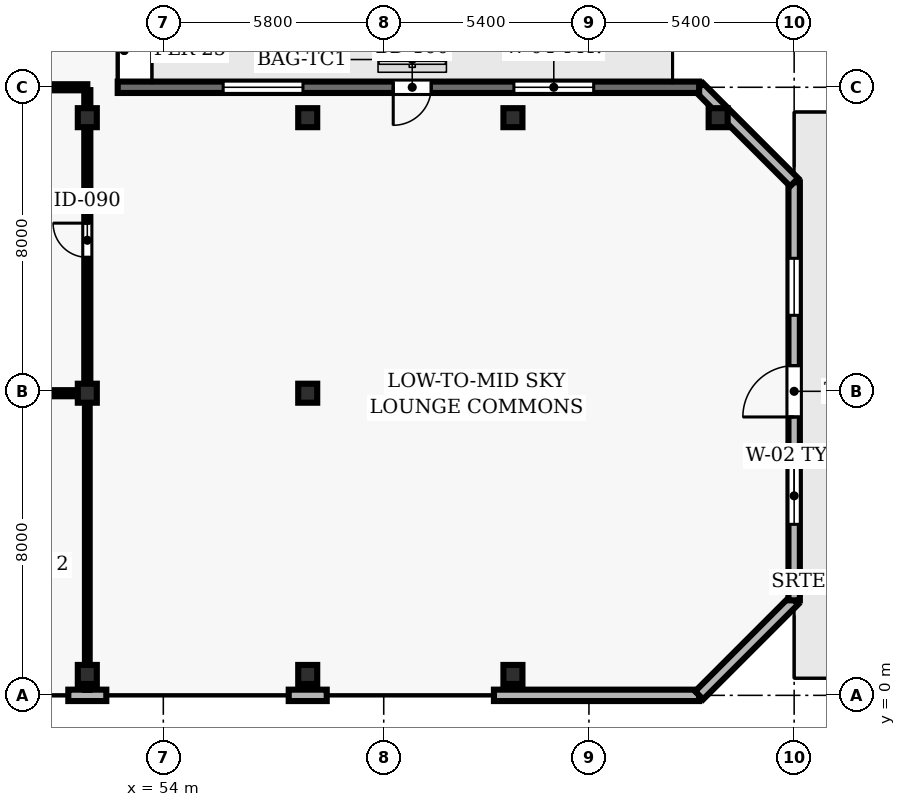
"""IFC4 building model, lengths in metres.
Left out: names, types, materials, properties, quantities, classifications, styles, units other than length and angle.
Written with IfcOpenShell. Run it as: python <this file> out.ifc"""

import sys

from ifc_helpers import new_model, si_unit, direction, frame, frame_2d, origin, origin_2d, place, context, subcontext, project, spatial, rectangle, hollow_rectangle, extrude, element, fill, save


model = new_model("IFC4")
c1 = context("Model", 3, precision=1e-05, world=origin(), true_north=direction((0.0, 1.0)))
c2 = subcontext(c1, "Body", "Model", "MODEL_VIEW")
j1 = project(units=[si_unit("LENGTHUNIT", "METRE"), si_unit("PLANEANGLEUNIT", "RADIAN")], contexts=[c1])
p1 = place(None, origin())
s1 = spatial("IfcSite", under=j1, at=p1, CompositionType="ELEMENT")
p2 = place(p1, origin())
s2 = spatial("IfcBuilding", under=s1, at=p2, CompositionType="ELEMENT")
p3 = place(p2, frame((0.0, 0.0, 98.4)))
s3 = spatial("IfcBuildingStorey", under=s2, at=p3, CompositionType="ELEMENT", Elevation=98.4)
for number, where, z_axis, x_axis in (
    (1, (52.0, 0.55, 0.0), (0.0, 0.0, 1.0), (1.0, 0.0, 0.0)),
    (2, (52.0, 7.95, 0.0), (0.0, 0.0, 1.0), (1.0, 0.0, 0.0)),
    (3, (52.0, 15.2, 0.0), (0.0, 0.0, 1.0), (1.0, 0.0, 0.0)),
    (4, (57.8, 0.55, 0.0), (0.0, 0.0, 1.0), (1.0, 0.0, 0.0)),
    (5, (57.8, 7.95, 0.0), (0.0, 0.0, 1.0), (1.0, 0.0, 0.0)),
    (6, (57.8, 15.2, 0.0), (0.0, 0.0, 1.0), (1.0, 0.0, 0.0)),
    (7, (63.2, 0.55, 0.0), (0.0, 0.0, 1.0), (1.0, 0.0, 0.0)),
    (8, (63.2, 15.2, 0.0), (0.0, 0.0, 1.0), (1.0, 0.0, 0.0)),
    (9, (68.6, 15.2, 0.0), (0.0, 0.0, 1.0), (1.0, 0.0, 0.0)),
):
    element("IfcColumn", number, at=place(p3, frame(where, z_axis=z_axis, x_axis=x_axis)), inside=s3, PredefinedType="COLUMN", context=c2, shape_type="SweptSolid", body=[
        extrude(hollow_rectangle(XDim=0.5, YDim=0.5, WallThickness=0.025, at=origin_2d()), origin(), (0.0, 0.0, 1.0), 5.0),
    ])
for number, where, z_axis, x_axis in (
    (10, (51.5, 0.0, 0.0), (0.0, 0.0, 1.0), (1.0, 0.0, 0.0)),
    (11, (57.3, 0.0, 0.0), (0.0, 0.0, 1.0), (1.0, 0.0, 0.0)),
):
    element("IfcWall", number, at=place(p3, frame(where, z_axis=z_axis, x_axis=x_axis)), inside=s3, PredefinedType="SOLIDWALL", context=c2, shape_type="SweptSolid", body=[
        extrude(rectangle(XDim=1.0, YDim=0.3, at=frame_2d((0.5, 0.0))), origin(), (0.0, 0.0, 1.0), 4.79),
    ])
p4 = place(p3, frame((62.7, 0.0, 0.0), z_axis=(0.0, 0.0, 1.0), x_axis=(1.0, 0.0, 0.0)))
e12 = element("IfcWall", 12, at=p4, inside=s3, PredefinedType="SOLIDWALL", context=c2, shape_type="SweptSolid", body=[
    extrude(rectangle(XDim=5.4, YDim=0.3, at=frame_2d((2.7, 0.0))), origin(), (0.0, 0.0, 1.0), 4.79),
])
p5 = place(p3, frame((68.1, 0.0, 0.0), z_axis=(0.0, 0.0, 1.0), x_axis=(0.707106781187, 0.707106781187, 0.0)))
e13 = element("IfcWall", 13, at=p5, inside=s3, PredefinedType="SOLIDWALL", context=c2, shape_type="SweptSolid", body=[
    extrude(rectangle(XDim=3.536, YDim=0.3, at=frame_2d((1.768, 0.0))), origin(), (0.0, 0.0, 1.0), 4.79),
])
p6 = place(p3, frame((70.6, 2.5, 0.0), z_axis=(0.0, 0.0, 1.0), x_axis=(0.0, 1.0, 0.0)))
e14 = element("IfcWall", 14, at=p6, inside=s3, PredefinedType="SOLIDWALL", context=c2, shape_type="SweptSolid", body=[
    extrude(rectangle(XDim=11.0, YDim=0.3, at=frame_2d((5.5, 0.0))), origin(), (0.0, 0.0, 1.0), 4.79),
])
p7 = place(p6, frame((4.825, 0.0, 0.0)))
e15 = element("IfcOpeningElement", 15, at=p7, cuts=e14, PredefinedType="OPENING", context=c2, shape_type="SweptSolid", body=[
    extrude(rectangle(XDim=1.35, YDim=2.2, at=frame_2d((0.675, 1.1))), frame((0.0, 0.16, 0.0), z_axis=(0.0, -1.0, 0.0), x_axis=(1.0, 0.0, 0.0)), (0.0, 0.0, 1.0), 0.32),
])
p8 = place(p6, frame((2.0, 0.0, 0.9)))
e16 = element("IfcOpeningElement", 16, at=p8, cuts=e14, PredefinedType="OPENING", context=c2, shape_type="SweptSolid", body=[
    extrude(rectangle(XDim=1.5, YDim=1.6, at=frame_2d((0.75, 0.8))), frame((0.0, 0.16, 0.0), z_axis=(0.0, -1.0, 0.0), x_axis=(1.0, 0.0, 0.0)), (0.0, 0.0, 1.0), 0.32),
])
p9 = place(p6, frame((7.5, 0.0, 0.9)))
e17 = element("IfcOpeningElement", 17, at=p9, cuts=e14, PredefinedType="OPENING", context=c2, shape_type="SweptSolid", body=[
    extrude(rectangle(XDim=1.5, YDim=1.6, at=frame_2d((0.75, 0.8))), frame((0.0, 0.16, 0.0), z_axis=(0.0, -1.0, 0.0), x_axis=(1.0, 0.0, 0.0)), (0.0, 0.0, 1.0), 0.32),
])
p10 = place(p3, frame((70.6, 13.5, 0.0), z_axis=(0.0, 0.0, 1.0), x_axis=(-0.707106781187, 0.707106781187, 0.0)))
e18 = element("IfcWall", 18, at=p10, inside=s3, PredefinedType="SOLIDWALL", context=c2, shape_type="SweptSolid", body=[
    extrude(rectangle(XDim=3.536, YDim=0.3, at=frame_2d((1.768, 0.0))), origin(), (0.0, 0.0, 1.0), 4.79),
])
p11 = place(p3, frame((68.1, 16.0, 0.0), z_axis=(0.0, 0.0, 1.0), x_axis=(-1.0, 0.0, 0.0)))
e19 = element("IfcWall", 19, at=p11, inside=s3, PredefinedType="SOLIDWALL", context=c2, shape_type="SweptSolid", body=[
    extrude(rectangle(XDim=15.3, YDim=0.3, at=frame_2d((7.65, 0.0))), origin(), (0.0, 0.0, 1.0), 4.79),
])
p12 = place(p11, frame((7.05, 0.0, 0.0)))
e20 = element("IfcOpeningElement", 20, at=p12, cuts=e19, PredefinedType="OPENING", context=c2, shape_type="SweptSolid", body=[
    extrude(rectangle(XDim=1.0, YDim=2.2, at=frame_2d((0.5, 1.1))), frame((0.0, 0.16, 0.0), z_axis=(0.0, -1.0, 0.0), x_axis=(1.0, 0.0, 0.0)), (0.0, 0.0, 1.0), 0.32),
])
p13 = place(p11, frame((2.775, 0.0, 0.9)))
e21 = element("IfcOpeningElement", 21, at=p13, cuts=e19, PredefinedType="OPENING", context=c2, shape_type="SweptSolid", body=[
    extrude(rectangle(XDim=2.1, YDim=1.6, at=frame_2d((1.05, 0.8))), frame((0.0, 0.16, 0.0), z_axis=(0.0, -1.0, 0.0), x_axis=(1.0, 0.0, 0.0)), (0.0, 0.0, 1.0), 0.32),
])
p14 = place(p11, frame((10.425, 0.0, 0.9)))
e22 = element("IfcOpeningElement", 22, at=p14, cuts=e19, PredefinedType="OPENING", context=c2, shape_type="SweptSolid", body=[
    extrude(rectangle(XDim=2.1, YDim=1.6, at=frame_2d((1.05, 0.8))), frame((0.0, 0.16, 0.0), z_axis=(0.0, -1.0, 0.0), x_axis=(1.0, 0.0, 0.0)), (0.0, 0.0, 1.0), 0.32),
])
p15 = place(p3, frame((46.0, 7.95, 0.0), z_axis=(0.0, 0.0, 1.0), x_axis=(1.0, 0.0, 0.0)))
e23 = element("IfcWall", 23, at=p15, inside=s3, PredefinedType="PARTITIONING", context=c2, shape_type="SweptSolid", body=[
    extrude(rectangle(XDim=6.0, YDim=0.16, at=frame_2d((3.0, 0.0))), origin(), (0.0, 0.0, 1.0), 4.173),
])
p16 = place(p15, frame((2.5, 0.0, 0.0)))
e24 = element("IfcOpeningElement", 24, at=p16, cuts=e23, PredefinedType="OPENING", context=c2, shape_type="SweptSolid", body=[
    extrude(rectangle(XDim=1.0, YDim=2.1, at=frame_2d((0.5, 1.05))), frame((0.0, 0.09, 0.0), z_axis=(0.0, -1.0, 0.0), x_axis=(1.0, 0.0, 0.0)), (0.0, 0.0, 1.0), 0.18),
])
p17 = place(p3, frame((52.0, 16.0, 0.0), z_axis=(0.0, 0.0, 1.0), x_axis=(-1.0, 0.0, 0.0)))
e25 = element("IfcWall", 25, at=p17, inside=s3, PredefinedType="PARTITIONING", context=c2, shape_type="SweptSolid", body=[
    extrude(rectangle(XDim=13.95, YDim=0.16, at=frame_2d((6.975, 0.0))), origin(), (0.0, 0.0, 1.0), 4.49),
])
p18 = place(p17, frame((7.575, 0.0, 0.0)))
e26 = element("IfcOpeningElement", 26, at=p18, cuts=e25, PredefinedType="OPENING", context=c2, shape_type="SweptSolid", body=[
    extrude(rectangle(XDim=0.9, YDim=2.1, at=frame_2d((0.45, 1.05))), frame((0.0, 0.09, 0.0), z_axis=(0.0, -1.0, 0.0), x_axis=(1.0, 0.0, 0.0)), (0.0, 0.0, 1.0), 0.18),
])
p19 = place(p3, frame((52.0, 7.875, 0.0), z_axis=(0.0, 0.0, 1.0), x_axis=(0.0, -1.0, 0.0)))
e27 = element("IfcWall", 27, at=p19, inside=s3, PredefinedType="PARTITIONING", context=c2, shape_type="SweptSolid", body=[
    extrude(rectangle(XDim=7.73, YDim=0.125, at=frame_2d((3.865, 0.0))), origin(), (0.0, 0.0, 1.0), 4.173),
])
p20 = place(p3, frame((52.0, 8.025, 0.0), z_axis=(0.0, 0.0, 1.0), x_axis=(0.0, 1.0, 0.0)))
e28 = element("IfcWall", 28, at=p20, inside=s3, PredefinedType="PARTITIONING", context=c2, shape_type="SweptSolid", body=[
    extrude(rectangle(XDim=7.9, YDim=0.16, at=frame_2d((3.95, 0.0))), origin(), (0.0, 0.0, 1.0), 4.173),
])
p21 = place(p20, frame((3.5, 0.0, 0.0)))
e29 = element("IfcOpeningElement", 29, at=p21, cuts=e28, PredefinedType="OPENING", context=c2, shape_type="SweptSolid", body=[
    extrude(rectangle(XDim=0.9, YDim=2.1, at=frame_2d((0.45, 1.05))), frame((0.0, 0.09, 0.0), z_axis=(0.0, -1.0, 0.0), x_axis=(1.0, 0.0, 0.0)), (0.0, 0.0, 1.0), 0.18),
])
p22 = place(p7, origin())
e30 = element("IfcDoor", 30, at=p22, inside=s3, OperationType="SINGLE_SWING_LEFT", PredefinedType="DOOR", context=c2, shape_type="SweptSolid", body=[
    extrude(rectangle(XDim=1.35, YDim=2.2, at=frame_2d((0.675, 1.1))), frame((0.0, 0.025, 0.0), z_axis=(0.0, -1.0, 0.0), x_axis=(1.0, 0.0, 0.0)), (0.0, 0.0, 1.0), 0.05),
])
fill(e15, e30)
p23 = place(p8, origin())
e31 = element("IfcWindow", 31, at=p23, inside=s3, PartitioningType="SINGLE_PANEL", PredefinedType="WINDOW", context=c2, shape_type="SweptSolid", body=[
    extrude(rectangle(XDim=1.5, YDim=1.6, at=frame_2d((0.75, 0.8))), frame((0.0, 0.03, 0.0), z_axis=(0.0, -1.0, 0.0), x_axis=(1.0, 0.0, 0.0)), (0.0, 0.0, 1.0), 0.06),
])
fill(e16, e31)
p24 = place(p9, origin())
e32 = element("IfcWindow", 32, at=p24, inside=s3, PartitioningType="SINGLE_PANEL", PredefinedType="WINDOW", context=c2, shape_type="SweptSolid", body=[
    extrude(rectangle(XDim=1.5, YDim=1.6, at=frame_2d((0.75, 0.8))), frame((0.0, 0.03, 0.0), z_axis=(0.0, -1.0, 0.0), x_axis=(1.0, 0.0, 0.0)), (0.0, 0.0, 1.0), 0.06),
])
fill(e17, e32)
p25 = place(p12, origin())
e33 = element("IfcDoor", 33, at=p25, inside=s3, OperationType="SINGLE_SWING_RIGHT", PredefinedType="DOOR", context=c2, shape_type="SweptSolid", body=[
    extrude(rectangle(XDim=1.0, YDim=2.2, at=frame_2d((0.5, 1.1))), frame((0.0, 0.025, 0.0), z_axis=(0.0, -1.0, 0.0), x_axis=(1.0, 0.0, 0.0)), (0.0, 0.0, 1.0), 0.05),
])
fill(e20, e33)
p26 = place(p13, origin())
e34 = element("IfcWindow", 34, at=p26, inside=s3, PartitioningType="SINGLE_PANEL", PredefinedType="WINDOW", context=c2, shape_type="SweptSolid", body=[
    extrude(rectangle(XDim=2.1, YDim=1.6, at=frame_2d((1.05, 0.8))), frame((0.0, 0.03, 0.0), z_axis=(0.0, -1.0, 0.0), x_axis=(1.0, 0.0, 0.0)), (0.0, 0.0, 1.0), 0.06),
])
fill(e21, e34)
p27 = place(p14, origin())
e35 = element("IfcWindow", 35, at=p27, inside=s3, PartitioningType="SINGLE_PANEL", PredefinedType="WINDOW", context=c2, shape_type="SweptSolid", body=[
    extrude(rectangle(XDim=2.1, YDim=1.6, at=frame_2d((1.05, 0.8))), frame((0.0, 0.03, 0.0), z_axis=(0.0, -1.0, 0.0), x_axis=(1.0, 0.0, 0.0)), (0.0, 0.0, 1.0), 0.06),
])
fill(e22, e35)
p28 = place(p21, origin())
e36 = element("IfcDoor", 36, at=p28, inside=s3, OperationType="SINGLE_SWING_RIGHT", PredefinedType="DOOR", context=c2, shape_type="SweptSolid", body=[
    extrude(rectangle(XDim=0.9, YDim=2.1, at=frame_2d((0.45, 1.05))), frame((0.0, 0.025, 0.0), z_axis=(0.0, -1.0, 0.0), x_axis=(1.0, 0.0, 0.0)), (0.0, 0.0, 1.0), 0.05),
])
fill(e29, e36)
save(model, sys.argv[1])
